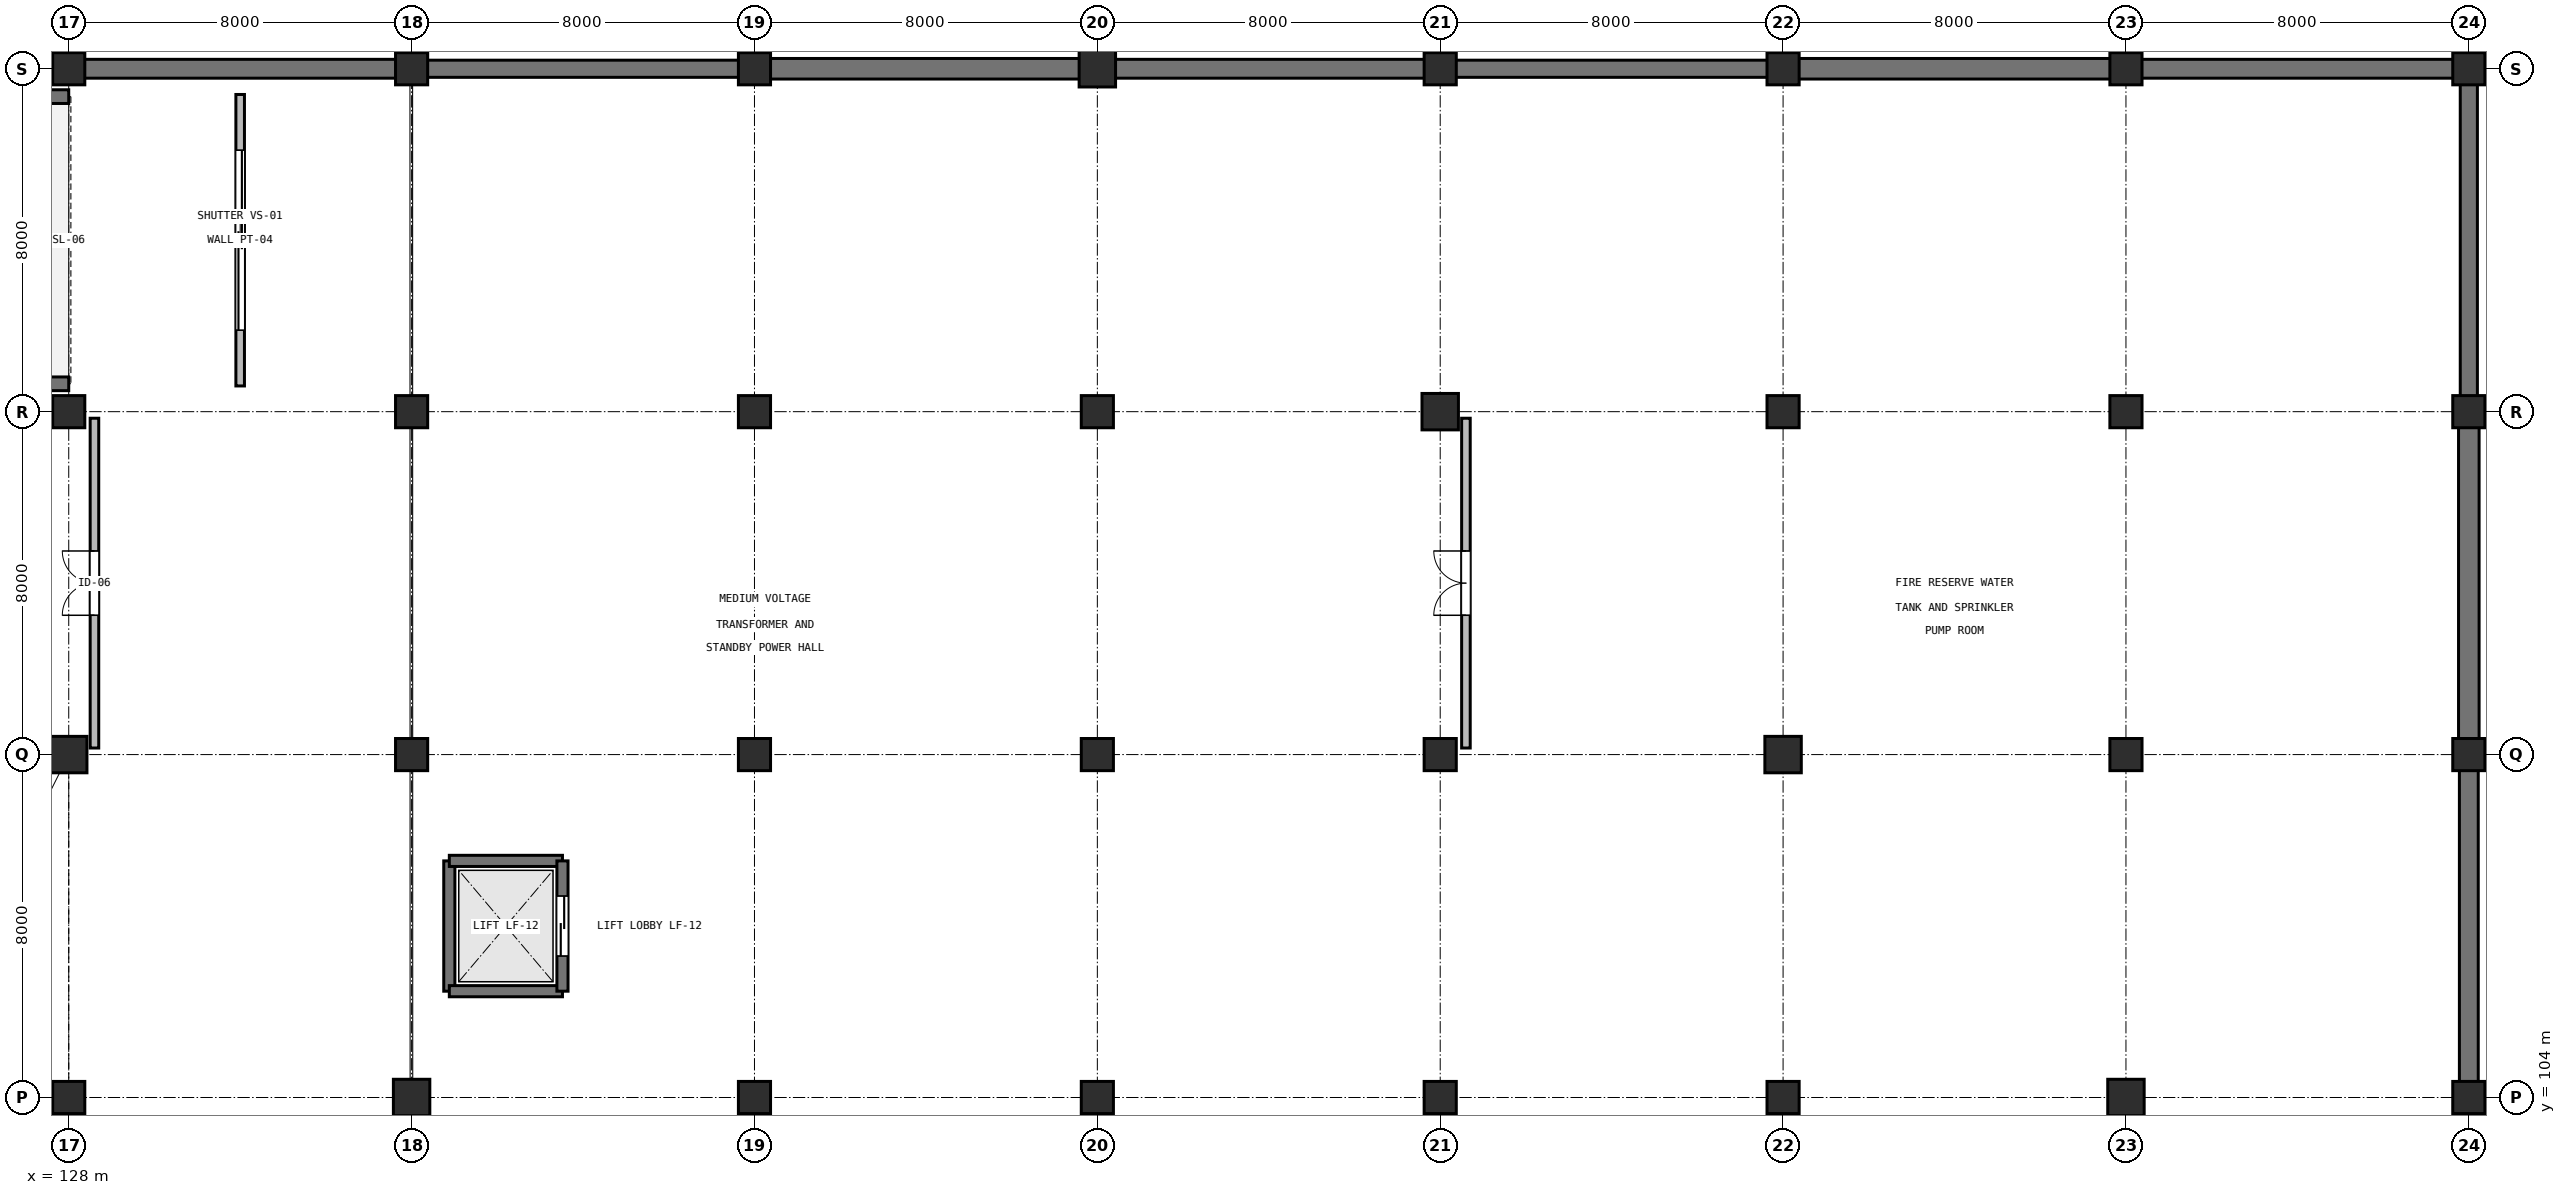
"""IFC4 building model, lengths in metres.
Left out: names, types, materials, properties, quantities, classifications, styles, units other than length and angle.
Written with IfcOpenShell. Run it as: python <this file> out.ifc"""

import sys

from ifc_helpers import new_model, si_unit, direction, frame, frame_2d, origin, origin_2d, place, context, subcontext, project, spatial, rectangle, extrude, element, fill, save


model = new_model("IFC4")
c1 = context("Model", 3, precision=1e-05, world=origin(), true_north=direction((0.0, 1.0)))
c2 = subcontext(c1, "Body", "Model", "MODEL_VIEW")
j1 = project(units=[si_unit("LENGTHUNIT", "METRE"), si_unit("PLANEANGLEUNIT", "RADIAN")], contexts=[c1])
p1 = place(None, origin())
s1 = spatial("IfcSite", under=j1, at=p1, CompositionType="ELEMENT")
p2 = place(p1, origin())
s2 = spatial("IfcBuilding", under=s1, at=p2, CompositionType="ELEMENT")
p3 = place(p2, frame((0.0, 0.0, -4.8)))
s3 = spatial("IfcBuildingStorey", under=s2, at=p3, CompositionType="ELEMENT", Elevation=-4.8)
p4 = place(p3, frame((128.0, 104.0, 0.0), z_axis=(0.0, 0.0, 1.0), x_axis=(1.0, 0.0, 0.0)))
e1 = element("IfcColumn", 1, at=p4, inside=s3, PredefinedType="COLUMN", context=c2, shape_type="SweptSolid", body=[
    extrude(rectangle(XDim=0.75, YDim=0.75, at=origin_2d()), origin(), (0.0, 0.0, 1.0), 4.8),
])
p5 = place(p3, frame((128.0, 112.0, 0.0), z_axis=(0.0, 0.0, 1.0), x_axis=(1.0, 0.0, 0.0)))
e2 = element("IfcColumn", 2, at=p5, inside=s3, PredefinedType="COLUMN", context=c2, shape_type="SweptSolid", body=[
    extrude(rectangle(XDim=0.85, YDim=0.85, at=origin_2d()), origin(), (0.0, 0.0, 1.0), 4.8),
])
for number, where, z_axis, x_axis in (
    (3, (128.0, 120.0, 0.0), (0.0, 0.0, 1.0), (1.0, 0.0, 0.0)),
    (4, (128.0, 128.0, 0.0), (0.0, 0.0, 1.0), (1.0, 0.0, 0.0)),
):
    element("IfcColumn", number, at=place(p3, frame(where, z_axis=z_axis, x_axis=x_axis)), inside=s3, PredefinedType="COLUMN", context=c2, shape_type="SweptSolid", body=[
        extrude(rectangle(XDim=0.75, YDim=0.75, at=origin_2d()), origin(), (0.0, 0.0, 1.0), 4.8),
    ])
p6 = place(p3, frame((136.0, 104.0, 0.0), z_axis=(0.0, 0.0, 1.0), x_axis=(1.0, 0.0, 0.0)))
e5 = element("IfcColumn", 5, at=p6, inside=s3, PredefinedType="COLUMN", context=c2, shape_type="SweptSolid", body=[
    extrude(rectangle(XDim=0.85, YDim=0.85, at=origin_2d()), origin(), (0.0, 0.0, 1.0), 4.8),
])
for number, where, z_axis, x_axis in (
    (6, (136.0, 112.0, 0.0), (0.0, 0.0, 1.0), (1.0, 0.0, 0.0)),
    (7, (136.0, 120.0, 0.0), (0.0, 0.0, 1.0), (1.0, 0.0, 0.0)),
    (8, (136.0, 128.0, 0.0), (0.0, 0.0, 1.0), (1.0, 0.0, 0.0)),
    (9, (144.0, 104.0, 0.0), (0.0, 0.0, 1.0), (1.0, 0.0, 0.0)),
    (10, (144.0, 112.0, 0.0), (0.0, 0.0, 1.0), (1.0, 0.0, 0.0)),
    (11, (144.0, 120.0, 0.0), (0.0, 0.0, 1.0), (1.0, 0.0, 0.0)),
    (12, (144.0, 128.0, 0.0), (0.0, 0.0, 1.0), (1.0, 0.0, 0.0)),
    (13, (152.0, 104.0, 0.0), (0.0, 0.0, 1.0), (1.0, 0.0, 0.0)),
    (14, (152.0, 112.0, 0.0), (0.0, 0.0, 1.0), (1.0, 0.0, 0.0)),
    (15, (152.0, 120.0, 0.0), (0.0, 0.0, 1.0), (1.0, 0.0, 0.0)),
):
    element("IfcColumn", number, at=place(p3, frame(where, z_axis=z_axis, x_axis=x_axis)), inside=s3, PredefinedType="COLUMN", context=c2, shape_type="SweptSolid", body=[
        extrude(rectangle(XDim=0.75, YDim=0.75, at=origin_2d()), origin(), (0.0, 0.0, 1.0), 4.8),
    ])
p7 = place(p3, frame((152.0, 128.0, 0.0), z_axis=(0.0, 0.0, 1.0), x_axis=(1.0, 0.0, 0.0)))
e16 = element("IfcColumn", 16, at=p7, inside=s3, PredefinedType="COLUMN", context=c2, shape_type="SweptSolid", body=[
    extrude(rectangle(XDim=0.85, YDim=0.85, at=origin_2d()), origin(), (0.0, 0.0, 1.0), 4.8),
])
for number, where, z_axis, x_axis in (
    (17, (160.0, 104.0, 0.0), (0.0, 0.0, 1.0), (1.0, 0.0, 0.0)),
    (18, (160.0, 112.0, 0.0), (0.0, 0.0, 1.0), (1.0, 0.0, 0.0)),
):
    element("IfcColumn", number, at=place(p3, frame(where, z_axis=z_axis, x_axis=x_axis)), inside=s3, PredefinedType="COLUMN", context=c2, shape_type="SweptSolid", body=[
        extrude(rectangle(XDim=0.75, YDim=0.75, at=origin_2d()), origin(), (0.0, 0.0, 1.0), 4.8),
    ])
p8 = place(p3, frame((160.0, 120.0, 0.0), z_axis=(0.0, 0.0, 1.0), x_axis=(1.0, 0.0, 0.0)))
e19 = element("IfcColumn", 19, at=p8, inside=s3, PredefinedType="COLUMN", context=c2, shape_type="SweptSolid", body=[
    extrude(rectangle(XDim=0.85, YDim=0.85, at=origin_2d()), origin(), (0.0, 0.0, 1.0), 4.8),
])
for number, where, z_axis, x_axis in (
    (20, (160.0, 128.0, 0.0), (0.0, 0.0, 1.0), (1.0, 0.0, 0.0)),
    (21, (168.0, 104.0, 0.0), (0.0, 0.0, 1.0), (1.0, 0.0, 0.0)),
):
    element("IfcColumn", number, at=place(p3, frame(where, z_axis=z_axis, x_axis=x_axis)), inside=s3, PredefinedType="COLUMN", context=c2, shape_type="SweptSolid", body=[
        extrude(rectangle(XDim=0.75, YDim=0.75, at=origin_2d()), origin(), (0.0, 0.0, 1.0), 4.8),
    ])
p9 = place(p3, frame((168.0, 112.0, 0.0), z_axis=(0.0, 0.0, 1.0), x_axis=(1.0, 0.0, 0.0)))
e22 = element("IfcColumn", 22, at=p9, inside=s3, PredefinedType="COLUMN", context=c2, shape_type="SweptSolid", body=[
    extrude(rectangle(XDim=0.85, YDim=0.85, at=origin_2d()), origin(), (0.0, 0.0, 1.0), 4.8),
])
for number, where, z_axis, x_axis in (
    (23, (168.0, 120.0, 0.0), (0.0, 0.0, 1.0), (1.0, 0.0, 0.0)),
    (24, (168.0, 128.0, 0.0), (0.0, 0.0, 1.0), (1.0, 0.0, 0.0)),
):
    element("IfcColumn", number, at=place(p3, frame(where, z_axis=z_axis, x_axis=x_axis)), inside=s3, PredefinedType="COLUMN", context=c2, shape_type="SweptSolid", body=[
        extrude(rectangle(XDim=0.75, YDim=0.75, at=origin_2d()), origin(), (0.0, 0.0, 1.0), 4.8),
    ])
p10 = place(p3, frame((176.0, 104.0, 0.0), z_axis=(0.0, 0.0, 1.0), x_axis=(1.0, 0.0, 0.0)))
e25 = element("IfcColumn", 25, at=p10, inside=s3, PredefinedType="COLUMN", context=c2, shape_type="SweptSolid", body=[
    extrude(rectangle(XDim=0.85, YDim=0.85, at=origin_2d()), origin(), (0.0, 0.0, 1.0), 4.8),
])
for number, where, z_axis, x_axis in (
    (26, (176.0, 112.0, 0.0), (0.0, 0.0, 1.0), (1.0, 0.0, 0.0)),
    (27, (176.0, 120.0, 0.0), (0.0, 0.0, 1.0), (1.0, 0.0, 0.0)),
    (28, (176.0, 128.0, 0.0), (0.0, 0.0, 1.0), (1.0, 0.0, 0.0)),
    (29, (184.0, 104.0, 0.0), (0.0, 0.0, 1.0), (1.0, 0.0, 0.0)),
    (30, (184.0, 112.0, 0.0), (0.0, 0.0, 1.0), (1.0, 0.0, 0.0)),
    (31, (184.0, 120.0, 0.0), (0.0, 0.0, 1.0), (1.0, 0.0, 0.0)),
    (32, (184.0, 128.0, 0.0), (0.0, 0.0, 1.0), (1.0, 0.0, 0.0)),
):
    element("IfcColumn", number, at=place(p3, frame(where, z_axis=z_axis, x_axis=x_axis)), inside=s3, PredefinedType="COLUMN", context=c2, shape_type="SweptSolid", body=[
        extrude(rectangle(XDim=0.75, YDim=0.75, at=origin_2d()), origin(), (0.0, 0.0, 1.0), 4.8),
    ])
p11 = place(p3, frame((184.0, 103.645, 0.0), z_axis=(0.0, 0.0, 1.0), x_axis=(0.0, -1.0, 0.0)))
e33 = element("IfcWall", 33, at=p11, inside=s3, PredefinedType="USERDEFINED", context=c2, shape_type="SweptSolid", body=[
    extrude(rectangle(XDim=7.24, YDim=0.4, at=frame_2d((3.62, 0.0))), origin(), (0.0, 0.0, 1.0), 4.46),
])
p12 = place(p3, frame((184.0, 111.645, 0.0), z_axis=(0.0, 0.0, 1.0), x_axis=(0.0, -1.0, 0.0)))
e34 = element("IfcWall", 34, at=p12, inside=s3, PredefinedType="USERDEFINED", context=c2, shape_type="SweptSolid", body=[
    extrude(rectangle(XDim=7.29, YDim=0.44, at=frame_2d((3.645, 0.0))), origin(), (0.0, 0.0, 1.0), 4.46),
])
p13 = place(p3, frame((184.0, 119.645, 0.0), z_axis=(0.0, 0.0, 1.0), x_axis=(0.0, -1.0, 0.0)))
e35 = element("IfcWall", 35, at=p13, inside=s3, PredefinedType="USERDEFINED", context=c2, shape_type="SweptSolid", body=[
    extrude(rectangle(XDim=7.29, YDim=0.48, at=frame_2d((3.645, 0.0))), origin(), (0.0, 0.0, 1.0), 4.46),
])
p14 = place(p3, frame((184.0, 127.645, 0.0), z_axis=(0.0, 0.0, 1.0), x_axis=(0.0, -1.0, 0.0)))
e36 = element("IfcWall", 36, at=p14, inside=s3, PredefinedType="USERDEFINED", context=c2, shape_type="SweptSolid", body=[
    extrude(rectangle(XDim=7.29, YDim=0.4, at=frame_2d((3.645, 0.0))), origin(), (0.0, 0.0, 1.0), 4.46),
])
p15 = place(p3, frame((176.355, 128.0, 0.0), z_axis=(0.0, 0.0, 1.0), x_axis=(1.0, 0.0, 0.0)))
e37 = element("IfcWall", 37, at=p15, inside=s3, PredefinedType="USERDEFINED", context=c2, shape_type="SweptSolid", body=[
    extrude(rectangle(XDim=7.29, YDim=0.44, at=frame_2d((3.645, 0.0))), origin(), (0.0, 0.0, 1.0), 4.46),
])
p16 = place(p3, frame((168.355, 128.0, 0.0), z_axis=(0.0, 0.0, 1.0), x_axis=(1.0, 0.0, 0.0)))
e38 = element("IfcWall", 38, at=p16, inside=s3, PredefinedType="USERDEFINED", context=c2, shape_type="SweptSolid", body=[
    extrude(rectangle(XDim=7.29, YDim=0.48, at=frame_2d((3.645, 0.0))), origin(), (0.0, 0.0, 1.0), 4.46),
])
p17 = place(p3, frame((160.355, 128.0, 0.0), z_axis=(0.0, 0.0, 1.0), x_axis=(1.0, 0.0, 0.0)))
e39 = element("IfcWall", 39, at=p17, inside=s3, PredefinedType="USERDEFINED", context=c2, shape_type="SweptSolid", body=[
    extrude(rectangle(XDim=7.29, YDim=0.4, at=frame_2d((3.645, 0.0))), origin(), (0.0, 0.0, 1.0), 4.46),
])
p18 = place(p3, frame((152.405, 128.0, 0.0), z_axis=(0.0, 0.0, 1.0), x_axis=(1.0, 0.0, 0.0)))
e40 = element("IfcWall", 40, at=p18, inside=s3, PredefinedType="USERDEFINED", context=c2, shape_type="SweptSolid", body=[
    extrude(rectangle(XDim=7.24, YDim=0.44, at=frame_2d((3.62, 0.0))), origin(), (0.0, 0.0, 1.0), 4.46),
])
p19 = place(p3, frame((144.355, 128.0, 0.0), z_axis=(0.0, 0.0, 1.0), x_axis=(1.0, 0.0, 0.0)))
e41 = element("IfcWall", 41, at=p19, inside=s3, PredefinedType="USERDEFINED", context=c2, shape_type="SweptSolid", body=[
    extrude(rectangle(XDim=7.24, YDim=0.48, at=frame_2d((3.62, 0.0))), origin(), (0.0, 0.0, 1.0), 4.46),
])
p20 = place(p3, frame((136.355, 128.0, 0.0), z_axis=(0.0, 0.0, 1.0), x_axis=(1.0, 0.0, 0.0)))
e42 = element("IfcWall", 42, at=p20, inside=s3, PredefinedType="USERDEFINED", context=c2, shape_type="SweptSolid", body=[
    extrude(rectangle(XDim=7.29, YDim=0.4, at=frame_2d((3.645, 0.0))), origin(), (0.0, 0.0, 1.0), 4.46),
])
p21 = place(p3, frame((128.355, 128.0, 0.0), z_axis=(0.0, 0.0, 1.0), x_axis=(1.0, 0.0, 0.0)))
e43 = element("IfcWall", 43, at=p21, inside=s3, PredefinedType="USERDEFINED", context=c2, shape_type="SweptSolid", body=[
    extrude(rectangle(XDim=7.29, YDim=0.44, at=frame_2d((3.645, 0.0))), origin(), (0.0, 0.0, 1.0), 4.46),
])
p22 = place(p3, frame((120.355, 128.0, 0.0), z_axis=(0.0, 0.0, 1.0), x_axis=(1.0, 0.0, 0.0)))
e44 = element("IfcWall", 44, at=p22, inside=s3, PredefinedType="USERDEFINED", context=c2, shape_type="SweptSolid", body=[
    extrude(rectangle(XDim=7.29, YDim=0.48, at=frame_2d((3.645, 0.0))), origin(), (0.0, 0.0, 1.0), 4.46),
])
p23 = place(p3, frame((136.88, 106.48, 0.0), z_axis=(0.0, 0.0, 1.0), x_axis=(0.0, 1.0, 0.0)))
e45 = element("IfcWall", 45, at=p23, inside=s3, PredefinedType="SHEAR", context=c2, shape_type="SweptSolid", body=[
    extrude(rectangle(XDim=3.04, YDim=0.26, at=frame_2d((1.52, 0.0))), origin(), (0.0, 0.0, 1.0), 4.46),
])
for number, where, z_axis, x_axis in (
    (46, (136.88, 109.52, 0.0), (0.0, 0.0, 1.0), (1.0, 0.0, 0.0)),
    (47, (139.52, 106.48, 0.0), (0.0, 0.0, 1.0), (-1.0, 0.0, 0.0)),
):
    element("IfcWall", number, at=place(p3, frame(where, z_axis=z_axis, x_axis=x_axis)), inside=s3, PredefinedType="SHEAR", context=c2, shape_type="SweptSolid", body=[
        extrude(rectangle(XDim=2.64, YDim=0.26, at=frame_2d((1.32, 0.0))), origin(), (0.0, 0.0, 1.0), 4.46),
    ])
p24 = place(p3, frame((139.52, 109.52, 0.0), z_axis=(0.0, 0.0, 1.0), x_axis=(0.0, -1.0, 0.0)))
e48 = element("IfcWall", 48, at=p24, inside=s3, PredefinedType="SHEAR", context=c2, shape_type="SweptSolid", body=[
    extrude(rectangle(XDim=3.04, YDim=0.26, at=frame_2d((1.52, 0.0))), origin(), (0.0, 0.0, 1.0), 4.46),
])
p25 = place(p24, frame((0.82, 0.0, 0.0)))
e49 = element("IfcOpeningElement", 49, at=p25, cuts=e48, PredefinedType="OPENING", context=c2, shape_type="SweptSolid", body=[
    extrude(rectangle(XDim=1.4, YDim=2.2, at=frame_2d((0.7, 1.1))), frame((0.0, 0.14, 0.0), z_axis=(0.0, -1.0, 0.0), x_axis=(1.0, 0.0, 0.0)), (0.0, 0.0, 1.0), 0.28),
])
for number, where, z_axis, x_axis in (
    (50, (96.0, 120.65, 0.0), (0.0, 0.0, 1.0), (1.0, 0.0, 0.0)),
    (51, (96.0, 127.35, 0.0), (0.0, 0.0, 1.0), (1.0, 0.0, 0.0)),
):
    element("IfcWall", number, at=place(p3, frame(where, z_axis=z_axis, x_axis=x_axis)), inside=s3, PredefinedType="SHEAR", context=c2, shape_type="SweptSolid", body=[
        extrude(rectangle(XDim=32.0, YDim=0.32, at=frame_2d((16.0, 0.0))), origin(), (0.0, 0.0, 1.0), 4.46),
    ])
p26 = place(p3, frame((132.0, 120.6, 0.0), z_axis=(0.0, 0.0, 1.0), x_axis=(0.0, 1.0, 0.0)))
e52 = element("IfcWall", 52, at=p26, inside=s3, PredefinedType="PARTITIONING", context=c2, shape_type="SweptSolid", body=[
    extrude(rectangle(XDim=6.8, YDim=0.2, at=frame_2d((3.4, 0.0))), origin(), (0.0, 0.0, 1.0), 4.2),
])
p27 = place(p26, frame((1.3, 0.0, 0.0)))
e53 = element("IfcOpeningElement", 53, at=p27, cuts=e52, PredefinedType="OPENING", context=c2, shape_type="SweptSolid", body=[
    extrude(rectangle(XDim=4.2, YDim=3.6, at=frame_2d((2.1, 1.8))), frame((0.0, 0.11, 0.0), z_axis=(0.0, -1.0, 0.0), x_axis=(1.0, 0.0, 0.0)), (0.0, 0.0, 1.0), 0.22),
])
p28 = place(p3, frame((128.6, 112.153, 0.0), z_axis=(0.0, 0.0, 1.0), x_axis=(0.0, 1.0, 0.0)))
e54 = element("IfcWall", 54, at=p28, inside=s3, PredefinedType="PARTITIONING", context=c2, shape_type="SweptSolid", body=[
    extrude(rectangle(XDim=7.693, YDim=0.2, at=frame_2d((3.847, 0.0))), origin(), (0.0, 0.0, 1.0), 3.45),
])
p29 = place(p28, frame((3.097, 0.0, 0.0)))
e55 = element("IfcOpeningElement", 55, at=p29, cuts=e54, PredefinedType="OPENING", context=c2, shape_type="SweptSolid", body=[
    extrude(rectangle(XDim=1.5, YDim=2.2, at=frame_2d((0.75, 1.1))), frame((0.0, 0.11, 0.0), z_axis=(0.0, -1.0, 0.0), x_axis=(1.0, 0.0, 0.0)), (0.0, 0.0, 1.0), 0.22),
])
p30 = place(p3, frame((160.6, 112.153, 0.0), z_axis=(0.0, 0.0, 1.0), x_axis=(0.0, 1.0, 0.0)))
e56 = element("IfcWall", 56, at=p30, inside=s3, PredefinedType="PARTITIONING", context=c2, shape_type="SweptSolid", body=[
    extrude(rectangle(XDim=7.693, YDim=0.2, at=frame_2d((3.847, 0.0))), origin(), (0.0, 0.0, 1.0), 3.45),
])
p31 = place(p30, frame((3.097, 0.0, 0.0)))
e57 = element("IfcOpeningElement", 57, at=p31, cuts=e56, PredefinedType="OPENING", context=c2, shape_type="SweptSolid", body=[
    extrude(rectangle(XDim=1.5, YDim=2.2, at=frame_2d((0.75, 1.1))), frame((0.0, 0.11, 0.0), z_axis=(0.0, -1.0, 0.0), x_axis=(1.0, 0.0, 0.0)), (0.0, 0.0, 1.0), 0.22),
])
p32 = place(p25, origin())
e58 = element("IfcDoor", 58, at=p32, inside=s3, OperationType="SLIDING_TO_LEFT", PredefinedType="DOOR", context=c2, shape_type="SweptSolid", body=[
    extrude(rectangle(XDim=1.4, YDim=2.2, at=frame_2d((0.7, 1.1))), frame((0.0, 0.025, 0.0), z_axis=(0.0, -1.0, 0.0), x_axis=(1.0, 0.0, 0.0)), (0.0, 0.0, 1.0), 0.05),
])
fill(e49, e58)
p33 = place(p27, origin())
e59 = element("IfcDoor", 59, at=p33, inside=s3, OperationType="ROLLINGUP", PredefinedType="DOOR", context=c2, shape_type="SweptSolid", body=[
    extrude(rectangle(XDim=4.2, YDim=3.6, at=frame_2d((2.1, 1.8))), frame((0.0, 0.025, 0.0), z_axis=(0.0, -1.0, 0.0), x_axis=(1.0, 0.0, 0.0)), (0.0, 0.0, 1.0), 0.05),
])
fill(e53, e59)
p34 = place(p29, origin())
e60 = element("IfcDoor", 60, at=p34, inside=s3, OperationType="DOUBLE_DOOR_SINGLE_SWING", PredefinedType="DOOR", context=c2, shape_type="SweptSolid", body=[
    extrude(rectangle(XDim=1.5, YDim=2.2, at=frame_2d((0.75, 1.1))), frame((0.0, 0.025, 0.0), z_axis=(0.0, -1.0, 0.0), x_axis=(1.0, 0.0, 0.0)), (0.0, 0.0, 1.0), 0.05),
])
fill(e55, e60)
p35 = place(p31, origin())
e61 = element("IfcDoor", 61, at=p35, inside=s3, OperationType="DOUBLE_DOOR_SINGLE_SWING", PredefinedType="DOOR", context=c2, shape_type="SweptSolid", body=[
    extrude(rectangle(XDim=1.5, YDim=2.2, at=frame_2d((0.75, 1.1))), frame((0.0, 0.025, 0.0), z_axis=(0.0, -1.0, 0.0), x_axis=(1.0, 0.0, 0.0)), (0.0, 0.0, 1.0), 0.05),
])
fill(e57, e61)
save(model, sys.argv[1])
